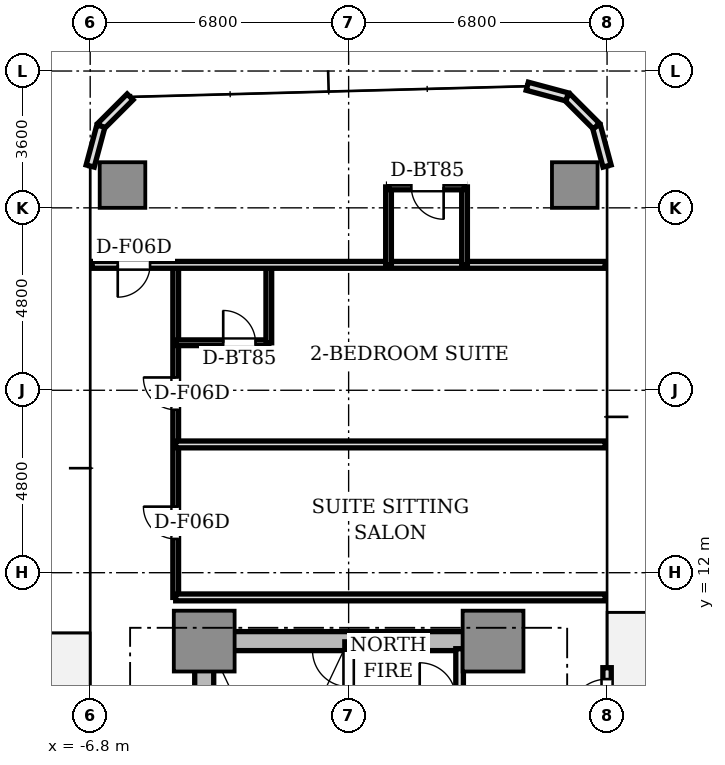
"""IFC4 building model, lengths in metres.
Left out: names, types, materials, properties, quantities, classifications, styles, units other than length and angle.
Written with IfcOpenShell. Run it as: python <this file> out.ifc"""

import sys

from ifc_helpers import new_model, si_unit, direction, frame, frame_2d, origin, origin_2d, place, context, subcontext, project, spatial, rectangle, extrude, source, transform, mapped, element, fill, save


model = new_model("IFC4")
c1 = context("Model", 3, precision=1e-05, world=origin(), true_north=direction((0.0, 1.0)))
c2 = subcontext(c1, "Body", "Model", "MODEL_VIEW")
j1 = project(units=[si_unit("LENGTHUNIT", "METRE"), si_unit("PLANEANGLEUNIT", "RADIAN")], contexts=[c1])
p1 = place(None, origin())
s1 = spatial("IfcSite", under=j1, at=p1, CompositionType="ELEMENT")
p2 = place(p1, origin())
s2 = spatial("IfcBuilding", under=s1, at=p2, CompositionType="ELEMENT")
p3 = place(p2, frame((0.0, 0.0, 67.8)))
s3 = spatial("IfcBuildingStorey", under=s2, at=p3, CompositionType="ELEMENT", Elevation=67.8)
p4 = place(p3, frame((-3.55, 10.2, 0.0), z_axis=(0.0, 0.0, 1.0), x_axis=(1.0, 0.0, 0.0)))
e1 = element("IfcWall", 1, at=p4, inside=s3, PredefinedType="SHEAR", context=c2, shape_type="SweptSolid", body=[
    extrude(rectangle(XDim=7.1, YDim=0.5, at=frame_2d((3.55, 0.0))), origin(), (0.0, 0.0, 1.0), 3.11),
])
p5 = place(p3, frame((-3.8, 2.85, 0.0), z_axis=(0.0, 0.0, 1.0), x_axis=(0.0, 1.0, 0.0)))
e2 = element("IfcWall", 2, at=p5, inside=s3, PredefinedType="SHEAR", context=c2, shape_type="SweptSolid", body=[
    extrude(rectangle(XDim=6.9, YDim=0.5, at=frame_2d((3.45, 0.0))), origin(), (0.0, 0.0, 1.0), 3.11),
])
m1 = source(origin(), c2, "Body", "SweptSolid", [
    extrude(rectangle(XDim=1.6, YDim=1.6, at=origin_2d()), origin(), (0.0, 0.0, 1.0), 3.11),
])
for number, where, z_axis, x_axis in (
    (3, (-3.8, 10.2, 0.0), (0.0, 0.0, 1.0), (1.0, 0.0, 0.0)),
    (4, (3.8, 10.2, 0.0), (0.0, 0.0, 1.0), (1.0, 0.0, 0.0)),
):
    element("IfcColumn", number, at=place(p3, frame(where, z_axis=z_axis, x_axis=x_axis)), inside=s3, PredefinedType="COLUMN", context=c2, shape_type="MappedRepresentation", body=[
        mapped(m1, transform((0.0, 0.0, 0.0), scale=1.0)),
    ])
m2 = source(origin(), c2, "Body", "SweptSolid", [
    extrude(rectangle(XDim=1.2, YDim=1.2, at=origin_2d()), origin(), (0.0, 0.0, 1.0), 3.11),
])
for number, where, z_axis, x_axis in (
    (5, (5.95, 22.2, 0.0), (0.0, 0.0, 1.0), (1.0, 0.0, 0.0)),
    (6, (-5.95, 22.2, 0.0), (0.0, 0.0, 1.0), (1.0, 0.0, 0.0)),
):
    element("IfcColumn", number, at=place(p3, frame(where, z_axis=z_axis, x_axis=x_axis)), inside=s3, PredefinedType="COLUMN", context=c2, shape_type="MappedRepresentation", body=[
        mapped(m2, transform((0.0, 0.0, 0.0), scale=1.0)),
    ])
p6 = place(p3, frame((6.8, 6.8, 0.0), z_axis=(0.0, 0.0, 1.0), x_axis=(0.0, 1.0, 0.0)))
e7 = element("IfcWall", 7, at=p6, inside=s3, PredefinedType="STANDARD", context=c2, shape_type="SweptSolid", body=[
    extrude(rectangle(XDim=2.7, YDim=0.22, at=frame_2d((1.35, 0.0))), origin(), (0.0, 0.0, 1.0), 3.11),
])
p7 = place(p6, frame((1.4, 0.0, 0.0)))
e8 = element("IfcOpeningElement", 8, at=p7, cuts=e7, PredefinedType="OPENING", context=c2, shape_type="SweptSolid", body=[
    extrude(rectangle(XDim=1.0, YDim=2.2, at=frame_2d((0.5, 1.1))), frame((0.0, 0.12, 0.0), z_axis=(0.0, -1.0, 0.0), x_axis=(1.0, 0.0, 0.0)), (0.0, 0.0, 1.0), 0.24),
])
for number, where, z_axis, x_axis in (
    (9, (6.8, 22.7, 0.0), (0.0, 0.0, 1.0), (-0.259, 0.966, 0.0)),
    (10, (6.519, 23.75, 0.0), (0.0, 0.0, 1.0), (-0.707, 0.707, 0.0)),
    (11, (5.75, 24.519, 0.0), (0.0, 0.0, 1.0), (-0.966, 0.259, 0.0)),
    (12, (-5.75, 24.519, 0.0), (0.0, 0.0, 1.0), (-0.707, -0.707, 0.0)),
    (13, (-6.519, 23.75, 0.0), (0.0, 0.0, 1.0), (-0.259, -0.966, 0.0)),
):
    element("IfcWall", number, at=place(p3, frame(where, z_axis=z_axis, x_axis=x_axis)), inside=s3, PredefinedType="STANDARD", context=c2, shape_type="SweptSolid", body=[
        extrude(rectangle(XDim=1.087, YDim=0.22, at=frame_2d((0.543, 0.0))), origin(), (0.0, 0.0, 1.0), 3.11),
    ])
p8 = place(p3, frame((0.0, 2.5, 0.0), z_axis=(0.0, 0.0, 1.0), x_axis=(0.0, 1.0, 0.0)))
e14 = element("IfcWall", 14, at=p8, inside=s3, PredefinedType="SOLIDWALL", context=c2, shape_type="SweptSolid", body=[
    extrude(rectangle(XDim=7.68, YDim=0.2, at=frame_2d((3.84, 0.0))), origin(), (0.0, 0.0, 1.0), 3.11),
])
p9 = place(p8, frame((6.5, 0.0, 0.0)))
e15 = element("IfcOpeningElement", 15, at=p9, cuts=e14, PredefinedType="OPENING", context=c2, shape_type="SweptSolid", body=[
    extrude(rectangle(XDim=0.95, YDim=2.15, at=frame_2d((0.475, 1.075))), frame((0.0, 0.11, 0.0), z_axis=(0.0, -1.0, 0.0), x_axis=(1.0, 0.0, 0.0)), (0.0, 0.0, 1.0), 0.22),
])
p10 = place(p3, frame((2.92, 8.68, 0.0), z_axis=(0.0, 0.0, 1.0), x_axis=(0.0, 1.0, 0.0)))
e16 = element("IfcWall", 16, at=p10, inside=s3, PredefinedType="SOLIDWALL", context=c2, shape_type="SweptSolid", body=[
    extrude(rectangle(XDim=1.32, YDim=0.2, at=frame_2d((0.66, 0.0))), origin(), (0.0, 0.0, 1.0), 2.66),
])
p11 = place(p3, frame((-4.55, 11.35, 0.0), z_axis=(0.0, 0.0, 1.0), x_axis=(0.0, 1.0, 0.0)))
e17 = element("IfcWall", 17, at=p11, inside=s3, PredefinedType="PARTITIONING", context=c2, shape_type="SweptSolid", body=[
    extrude(rectangle(XDim=8.75, YDim=0.15, at=frame_2d((4.375, 0.0))), origin(), (0.0, 0.0, 1.0), 2.63),
])
p12 = place(p11, frame((1.538, 0.0, 0.0)))
e18 = element("IfcOpeningElement", 18, at=p12, cuts=e17, PredefinedType="OPENING", context=c2, shape_type="SweptSolid", body=[
    extrude(rectangle(XDim=0.85, YDim=2.1, at=frame_2d((0.425, 1.05))), frame((0.0, 0.085, 0.0), z_axis=(0.0, -1.0, 0.0), x_axis=(1.0, 0.0, 0.0)), (0.0, 0.0, 1.0), 0.17),
])
p13 = place(p11, frame((4.937, 0.0, 0.0)))
e19 = element("IfcOpeningElement", 19, at=p13, cuts=e17, PredefinedType="OPENING", context=c2, shape_type="SweptSolid", body=[
    extrude(rectangle(XDim=0.85, YDim=2.1, at=frame_2d((0.425, 1.05))), frame((0.0, 0.085, 0.0), z_axis=(0.0, -1.0, 0.0), x_axis=(1.0, 0.0, 0.0)), (0.0, 0.0, 1.0), 0.17),
])
for number, where, z_axis, x_axis in (
    (20, (6.75, 11.35, 0.0), (0.0, 0.0, 1.0), (-1.0, 0.0, 0.0)),
    (21, (-4.55, 15.375, 0.0), (0.0, 0.0, 1.0), (1.0, 0.0, 0.0)),
):
    element("IfcWall", number, at=place(p3, frame(where, z_axis=z_axis, x_axis=x_axis)), inside=s3, PredefinedType="PARTITIONING", context=c2, shape_type="SweptSolid", body=[
        extrude(rectangle(XDim=11.3, YDim=0.18, at=frame_2d((5.65, 0.0))), origin(), (0.0, 0.0, 1.0), 2.66),
    ])
p14 = place(p3, frame((-4.55, 18.05, 0.0), z_axis=(0.0, 0.0, 1.0), x_axis=(1.0, 0.0, 0.0)))
e22 = element("IfcWall", 22, at=p14, inside=s3, PredefinedType="PARTITIONING", context=c2, shape_type="SweptSolid", body=[
    extrude(rectangle(XDim=2.45, YDim=0.15, at=frame_2d((1.225, 0.0))), origin(), (0.0, 0.0, 1.0), 2.66),
])
p15 = place(p14, frame((1.25, 0.0, 0.0)))
e23 = element("IfcOpeningElement", 23, at=p15, cuts=e22, PredefinedType="OPENING", context=c2, shape_type="SweptSolid", body=[
    extrude(rectangle(XDim=0.85, YDim=2.1, at=frame_2d((0.425, 1.05))), frame((0.0, 0.085, 0.0), z_axis=(0.0, -1.0, 0.0), x_axis=(1.0, 0.0, 0.0)), (0.0, 0.0, 1.0), 0.17),
])
p16 = place(p3, frame((-2.1, 18.05, 0.0), z_axis=(0.0, 0.0, 1.0), x_axis=(0.0, 1.0, 0.0)))
e24 = element("IfcWall", 24, at=p16, inside=s3, PredefinedType="PARTITIONING", context=c2, shape_type="SweptSolid", body=[
    extrude(rectangle(XDim=2.05, YDim=0.15, at=frame_2d((1.025, 0.0))), origin(), (0.0, 0.0, 1.0), 2.66),
])
p17 = place(p3, frame((6.75, 20.1, 0.0), z_axis=(0.0, 0.0, 1.0), x_axis=(-1.0, 0.0, 0.0)))
e25 = element("IfcWall", 25, at=p17, inside=s3, PredefinedType="PARTITIONING", context=c2, shape_type="SweptSolid", body=[
    extrude(rectangle(XDim=13.5, YDim=0.18, at=frame_2d((6.75, 0.0))), origin(), (0.0, 0.0, 1.0), 2.66),
])
p18 = place(p17, frame((11.975, 0.0, 0.0)))
e26 = element("IfcOpeningElement", 26, at=p18, cuts=e25, PredefinedType="OPENING", context=c2, shape_type="SweptSolid", body=[
    extrude(rectangle(XDim=0.85, YDim=2.1, at=frame_2d((0.425, 1.05))), frame((0.0, 0.1, 0.0), z_axis=(0.0, -1.0, 0.0), x_axis=(1.0, 0.0, 0.0)), (0.0, 0.0, 1.0), 0.2),
])
for number, where, z_axis, x_axis in (
    (27, (1.05, 20.1, 0.0), (0.0, 0.0, 1.0), (0.0, 1.0, 0.0)),
    (28, (3.05, 20.1, 0.0), (0.0, 0.0, 1.0), (0.0, 1.0, 0.0)),
):
    element("IfcWall", number, at=place(p3, frame(where, z_axis=z_axis, x_axis=x_axis)), inside=s3, PredefinedType="PARTITIONING", context=c2, shape_type="SweptSolid", body=[
        extrude(rectangle(XDim=2.05, YDim=0.15, at=frame_2d((1.025, 0.0))), origin(), (0.0, 0.0, 1.0), 2.66),
    ])
p19 = place(p3, frame((3.05, 22.15, 0.0), z_axis=(0.0, 0.0, 1.0), x_axis=(-1.0, 0.0, 0.0)))
e29 = element("IfcWall", 29, at=p19, inside=s3, PredefinedType="PARTITIONING", context=c2, shape_type="SweptSolid", body=[
    extrude(rectangle(XDim=2.0, YDim=0.15, at=frame_2d((1.0, 0.0))), origin(), (0.0, 0.0, 1.0), 2.58),
])
p20 = place(p19, frame((0.55, 0.0, 0.0)))
e30 = element("IfcOpeningElement", 30, at=p20, cuts=e29, PredefinedType="OPENING", context=c2, shape_type="SweptSolid", body=[
    extrude(rectangle(XDim=0.85, YDim=2.1, at=frame_2d((0.425, 1.05))), frame((0.0, 0.085, 0.0), z_axis=(0.0, -1.0, 0.0), x_axis=(1.0, 0.0, 0.0)), (0.0, 0.0, 1.0), 0.17),
])
m3 = source(origin(), c2, "Body", "SweptSolid", [
    extrude(rectangle(XDim=1.0, YDim=0.05, at=origin_2d()), origin(), (0.0, 0.0, 1.0), 2.2),
])
p21 = place(p7, frame((0.5, 0.0, 0.0)))
e31 = element("IfcDoor", 31, at=p21, inside=s3, OperationType="SINGLE_SWING_LEFT", PredefinedType="DOOR", context=c2, shape_type="MappedRepresentation", body=[
    mapped(m3, transform((0.0, 0.0, 0.0), scale=1.0)),
])
fill(e8, e31)
m4 = source(origin(), c2, "Body", "SweptSolid", [
    extrude(rectangle(XDim=0.95, YDim=0.05, at=origin_2d()), origin(), (0.0, 0.0, 1.0), 2.15),
])
p22 = place(p9, frame((0.475, 0.0, 0.0)))
e32 = element("IfcDoor", 32, at=p22, inside=s3, OperationType="SINGLE_SWING_RIGHT", PredefinedType="DOOR", context=c2, shape_type="MappedRepresentation", body=[
    mapped(m4, transform((0.0, 0.0, 0.0), scale=1.0)),
])
fill(e15, e32)
m5 = source(origin(), c2, "Body", "SweptSolid", [
    extrude(rectangle(XDim=0.85, YDim=0.05, at=origin_2d()), origin(), (0.0, 0.0, 1.0), 2.1),
])
p23 = place(p12, frame((0.425, 0.0, 0.0)))
e33 = element("IfcDoor", 33, at=p23, inside=s3, OperationType="SINGLE_SWING_RIGHT", PredefinedType="DOOR", context=c2, shape_type="MappedRepresentation", body=[
    mapped(m5, transform((0.0, 0.0, 0.0), scale=1.0)),
])
fill(e18, e33)
p24 = place(p15, frame((0.425, 0.0, 0.0)))
e34 = element("IfcDoor", 34, at=p24, inside=s3, OperationType="SINGLE_SWING_LEFT", PredefinedType="DOOR", context=c2, shape_type="MappedRepresentation", body=[
    mapped(m5, transform((0.0, 0.0, 0.0), scale=1.0)),
])
fill(e23, e34)
p25 = place(p13, frame((0.425, 0.0, 0.0)))
e35 = element("IfcDoor", 35, at=p25, inside=s3, OperationType="SINGLE_SWING_RIGHT", PredefinedType="DOOR", context=c2, shape_type="MappedRepresentation", body=[
    mapped(m5, transform((0.0, 0.0, 0.0), scale=1.0)),
])
fill(e19, e35)
p26 = place(p20, frame((0.425, 0.0, 0.0)))
e36 = element("IfcDoor", 36, at=p26, inside=s3, OperationType="SINGLE_SWING_LEFT", PredefinedType="DOOR", context=c2, shape_type="MappedRepresentation", body=[
    mapped(m5, transform((0.0, 0.0, 0.0), scale=1.0)),
])
fill(e30, e36)
p27 = place(p18, frame((0.425, 0.0, 0.0)))
e37 = element("IfcDoor", 37, at=p27, inside=s3, OperationType="SINGLE_SWING_RIGHT", PredefinedType="DOOR", context=c2, shape_type="MappedRepresentation", body=[
    mapped(m5, transform((0.0, 0.0, 0.0), scale=1.0)),
])
fill(e26, e37)
save(model, sys.argv[1])
